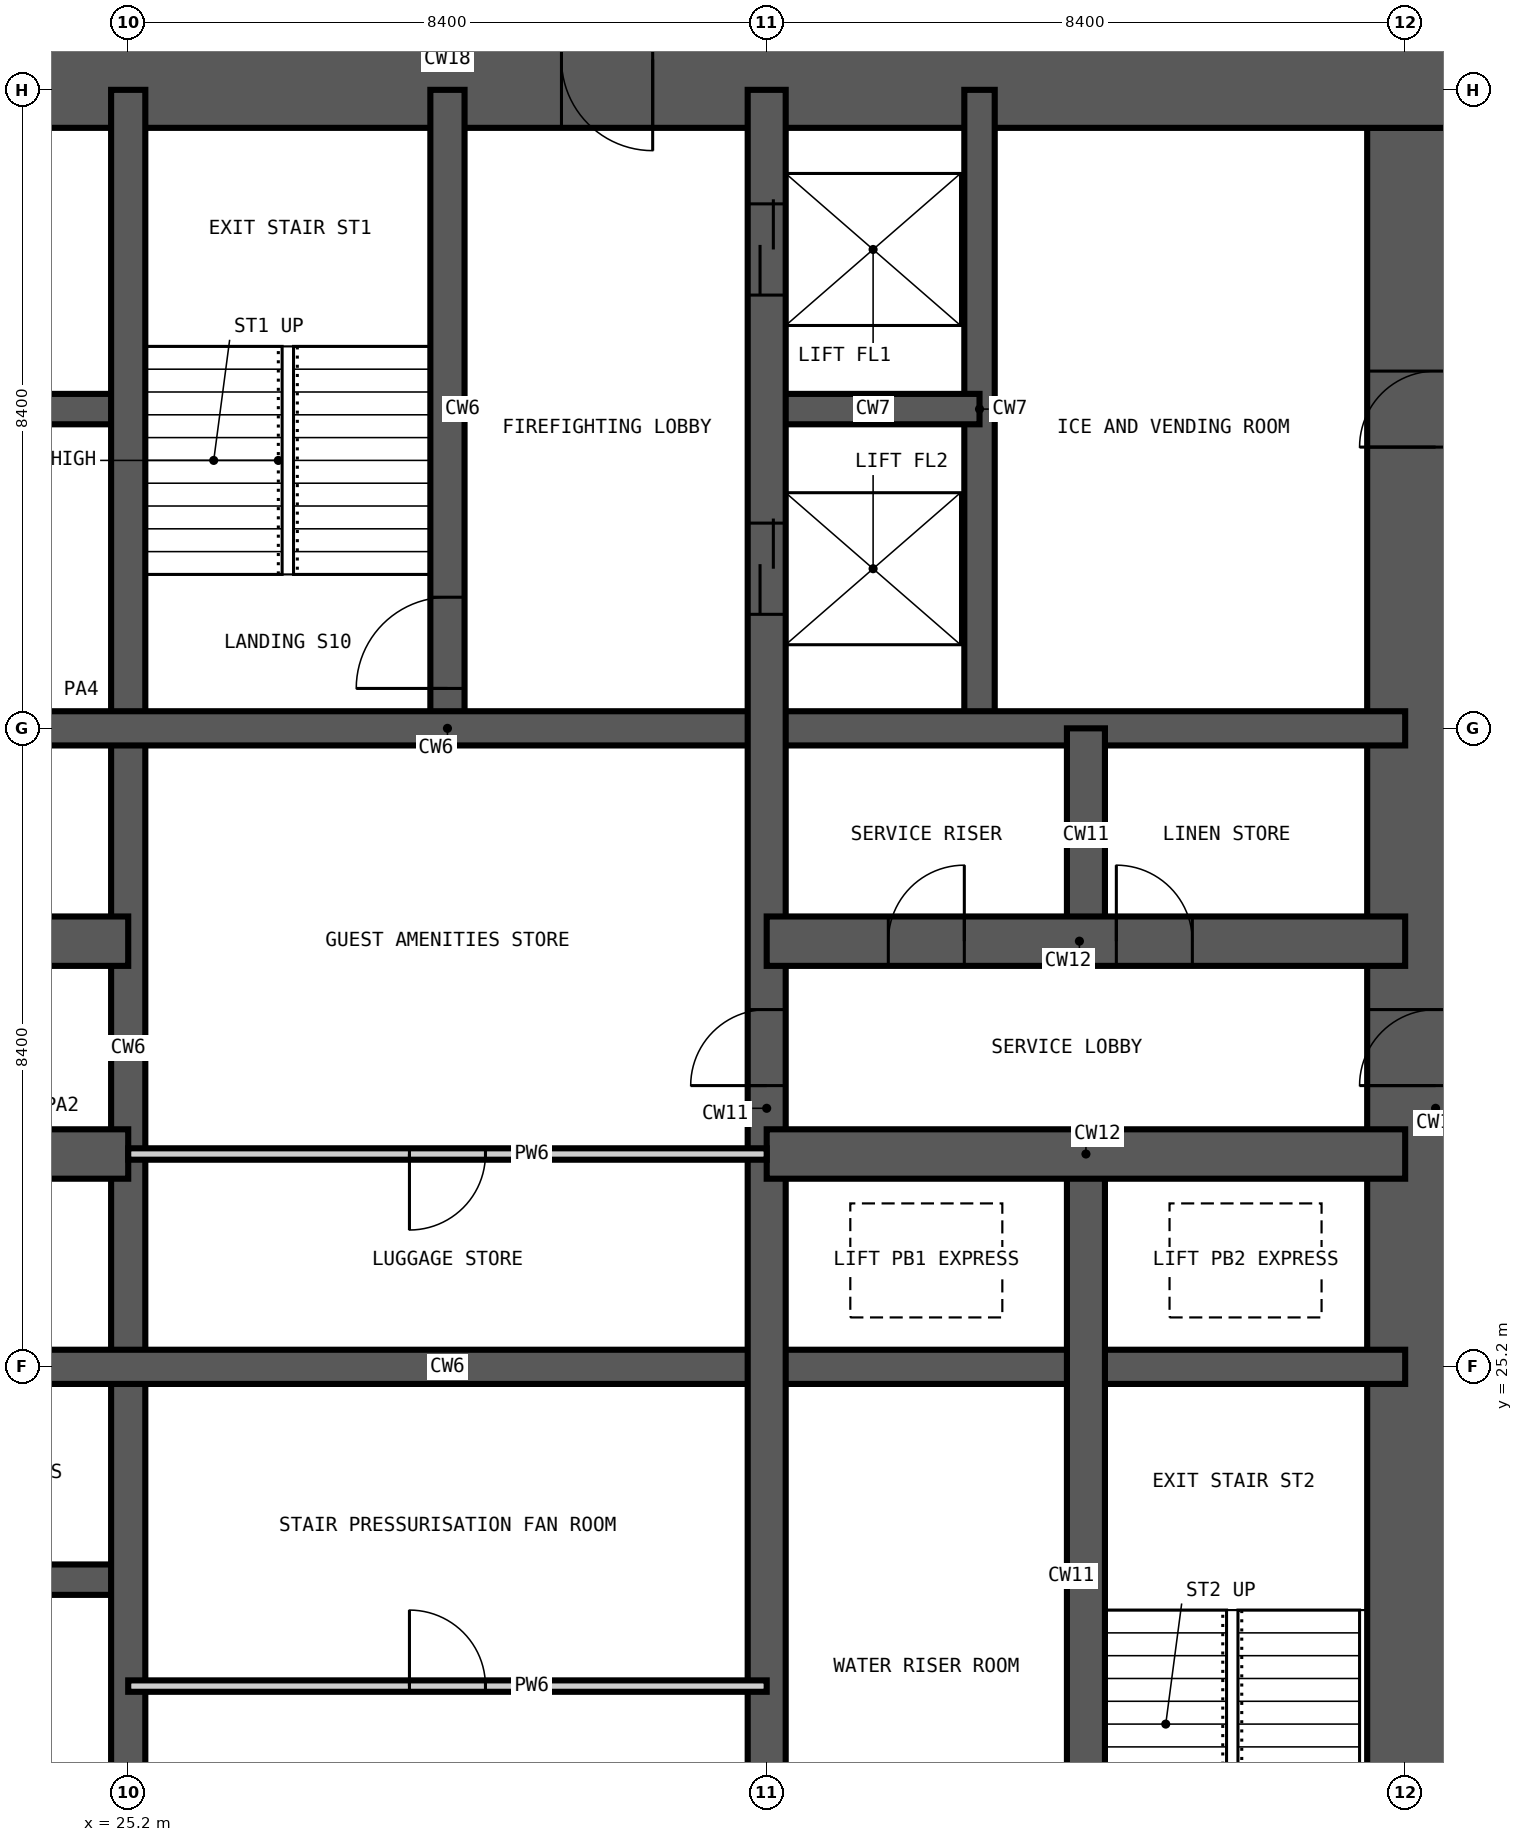
"""IFC4 building model, lengths in metres.
Left out: names, types, materials, properties, quantities, classifications, styles, units other than length and angle.
Written with IfcOpenShell. Run it as: python <this file> out.ifc"""

import sys

from ifc_helpers import new_model, si_unit, direction, frame, frame_2d, origin, place, context, subcontext, project, spatial, rectangle, extrude, element, fill, save


model = new_model("IFC4")
c1 = context("Model", 3, precision=1e-05, world=origin(), true_north=direction((0.0, 1.0)))
c2 = subcontext(c1, "Body", "Model", "MODEL_VIEW")
j1 = project(units=[si_unit("LENGTHUNIT", "METRE"), si_unit("PLANEANGLEUNIT", "RADIAN")], contexts=[c1])
p1 = place(None, origin())
s1 = spatial("IfcSite", under=j1, at=p1, CompositionType="ELEMENT")
p2 = place(p1, origin())
s2 = spatial("IfcBuilding", under=s1, at=p2, CompositionType="ELEMENT")
p3 = place(p2, frame((0.0, 0.0, 30.6)))
s3 = spatial("IfcBuildingStorey", under=s2, at=p3, CompositionType="ELEMENT", Elevation=30.6)
p4 = place(p3, frame((42.4, 17.3, -0.35), z_axis=(0.0, 0.0, 1.0), x_axis=(0.0, 1.0, 0.0)))
e1 = element("IfcWall", 1, at=p4, inside=s3, PredefinedType="SHEAR", context=c2, shape_type="SweptSolid", body=[
    extrude(rectangle(XDim=24.2, YDim=1.8, at=frame_2d((12.1, 0.0))), origin(), (0.0, 0.0, 1.0), 3.6),
])
p5 = place(p4, frame((0.3, 0.0, 0.35)))
e2 = element("IfcOpeningElement", 2, at=p5, cuts=e1, PredefinedType="OPENING", context=c2, shape_type="SweptSolid", body=[
    extrude(rectangle(XDim=1.2, YDim=2.2, at=frame_2d((0.6, 1.1))), frame((0.0, 0.91, 0.0), z_axis=(0.0, -1.0, 0.0), x_axis=(1.0, 0.0, 0.0)), (0.0, 0.0, 1.0), 1.82),
])
p6 = place(p4, frame((11.6, 0.0, 0.35)))
e3 = element("IfcOpeningElement", 3, at=p6, cuts=e1, PredefinedType="OPENING", context=c2, shape_type="SweptSolid", body=[
    extrude(rectangle(XDim=1.0, YDim=2.1, at=frame_2d((0.5, 1.05))), frame((0.0, 0.91, 0.0), z_axis=(0.0, -1.0, 0.0), x_axis=(1.0, 0.0, 0.0)), (0.0, 0.0, 1.0), 1.82),
])
p7 = place(p4, frame((20.0, 0.0, 0.35)))
e4 = element("IfcOpeningElement", 4, at=p7, cuts=e1, PredefinedType="OPENING", context=c2, shape_type="SweptSolid", body=[
    extrude(rectangle(XDim=1.0, YDim=2.1, at=frame_2d((0.5, 1.05))), frame((0.0, 0.91, 0.0), z_axis=(0.0, -1.0, 0.0), x_axis=(1.0, 0.0, 0.0)), (0.0, 0.0, 1.0), 1.82),
])
p8 = place(p3, frame((43.3, 42.4, -0.35), z_axis=(0.0, 0.0, 1.0), x_axis=(-1.0, 0.0, 0.0)))
e5 = element("IfcWall", 5, at=p8, inside=s3, PredefinedType="SHEAR", context=c2, shape_type="SweptSolid", body=[
    extrude(rectangle(XDim=27.8, YDim=1.8, at=frame_2d((13.9, 0.0))), origin(), (0.0, 0.0, 1.0), 3.6),
])
p9 = place(p8, frame((21.8, 0.0, 0.35)))
e6 = element("IfcOpeningElement", 6, at=p9, cuts=e5, PredefinedType="OPENING", context=c2, shape_type="SweptSolid", body=[
    extrude(rectangle(XDim=1.0, YDim=2.1, at=frame_2d((0.5, 1.05))), frame((0.0, 0.91, 0.0), z_axis=(0.0, -1.0, 0.0), x_axis=(1.0, 0.0, 0.0)), (0.0, 0.0, 1.0), 1.82),
])
p10 = place(p8, frame((11.2, 0.0, 0.35)))
e7 = element("IfcOpeningElement", 7, at=p10, cuts=e5, PredefinedType="OPENING", context=c2, shape_type="SweptSolid", body=[
    extrude(rectangle(XDim=1.2, YDim=2.2, at=frame_2d((0.6, 1.1))), frame((0.0, 0.91, 0.0), z_axis=(0.0, -1.0, 0.0), x_axis=(1.0, 0.0, 0.0)), (0.0, 0.0, 1.0), 1.82),
])
for number, where, z_axis, x_axis in (
    (8, (36.4, 33.6, -0.35), (0.0, 0.0, 1.0), (0.0, 1.0, 0.0)),
    (9, (16.8, 22.4, -0.35), (0.0, 0.0, 1.0), (1.0, 0.0, 0.0)),
    (10, (16.8, 37.8, -0.35), (0.0, 0.0, 1.0), (1.0, 0.0, 0.0)),
):
    element("IfcWall", number, at=place(p3, frame(where, z_axis=z_axis, x_axis=x_axis)), inside=s3, PredefinedType="SHEAR", context=c2, shape_type="SweptSolid", body=[
        extrude(rectangle(XDim=8.4, YDim=0.4, at=frame_2d((4.2, 0.0))), origin(), (0.0, 0.0, 1.0), 3.6),
    ])
p11 = place(p3, frame((33.6, 37.8, -0.35), z_axis=(0.0, 0.0, 1.0), x_axis=(1.0, 0.0, 0.0)))
e11 = element("IfcWall", 11, at=p11, inside=s3, PredefinedType="SHEAR", context=c2, shape_type="SweptSolid", body=[
    extrude(rectangle(XDim=2.8, YDim=0.4, at=frame_2d((1.4, 0.0))), origin(), (0.0, 0.0, 1.0), 3.6),
])
p12 = place(p3, frame((25.2, 16.8, -0.35), z_axis=(0.0, 0.0, 1.0), x_axis=(0.0, 1.0, 0.0)))
e12 = element("IfcWall", 12, at=p12, inside=s3, PredefinedType="SHEAR", context=c2, shape_type="SweptSolid", body=[
    extrude(rectangle(XDim=25.2, YDim=0.45, at=frame_2d((12.6, 0.0))), origin(), (0.0, 0.0, 1.0), 3.6),
])
p13 = place(p3, frame((29.4, 33.6, -0.35), z_axis=(0.0, 0.0, 1.0), x_axis=(0.0, 1.0, 0.0)))
e13 = element("IfcWall", 13, at=p13, inside=s3, PredefinedType="SHEAR", context=c2, shape_type="SweptSolid", body=[
    extrude(rectangle(XDim=8.4, YDim=0.45, at=frame_2d((4.2, 0.0))), origin(), (0.0, 0.0, 1.0), 3.6),
])
p14 = place(p13, frame((0.525, 0.0, 0.35)))
e14 = element("IfcOpeningElement", 14, at=p14, cuts=e13, PredefinedType="OPENING", context=c2, shape_type="SweptSolid", body=[
    extrude(rectangle(XDim=1.2, YDim=2.2, at=frame_2d((0.6, 1.1))), frame((0.0, 0.235, 0.0), z_axis=(0.0, -1.0, 0.0), x_axis=(1.0, 0.0, 0.0)), (0.0, 0.0, 1.0), 0.47),
])
for number, where, z_axis, x_axis in (
    (15, (16.8, 25.2, -0.35), (0.0, 0.0, 1.0), (1.0, 0.0, 0.0)),
    (16, (16.8, 33.6, -0.35), (0.0, 0.0, 1.0), (1.0, 0.0, 0.0)),
):
    element("IfcWall", number, at=place(p3, frame(where, z_axis=z_axis, x_axis=x_axis)), inside=s3, PredefinedType="SHEAR", context=c2, shape_type="SweptSolid", body=[
        extrude(rectangle(XDim=25.2, YDim=0.45, at=frame_2d((12.6, 0.0))), origin(), (0.0, 0.0, 1.0), 3.6),
    ])
p15 = place(p3, frame((33.6, 16.8, -0.35), z_axis=(0.0, 0.0, 1.0), x_axis=(0.0, 1.0, 0.0)))
e17 = element("IfcWall", 17, at=p15, inside=s3, PredefinedType="SHEAR", context=c2, shape_type="SweptSolid", body=[
    extrude(rectangle(XDim=25.2, YDim=0.5, at=frame_2d((12.6, 0.0))), origin(), (0.0, 0.0, 1.0), 3.6),
])
p16 = place(p15, frame((22.5, 0.0, 0.35)))
e18 = element("IfcOpeningElement", 18, at=p16, cuts=e17, PredefinedType="OPENING", context=c2, shape_type="SweptSolid", body=[
    extrude(rectangle(XDim=1.2, YDim=2.2, at=frame_2d((0.6, 1.1))), frame((0.0, 0.26, 0.0), z_axis=(0.0, -1.0, 0.0), x_axis=(1.0, 0.0, 0.0)), (0.0, 0.0, 1.0), 0.52),
])
p17 = place(p15, frame((18.3, 0.0, 0.35)))
e19 = element("IfcOpeningElement", 19, at=p17, cuts=e17, PredefinedType="OPENING", context=c2, shape_type="SweptSolid", body=[
    extrude(rectangle(XDim=1.2, YDim=2.2, at=frame_2d((0.6, 1.1))), frame((0.0, 0.26, 0.0), z_axis=(0.0, -1.0, 0.0), x_axis=(1.0, 0.0, 0.0)), (0.0, 0.0, 1.0), 0.52),
])
p18 = place(p15, frame((12.1, 0.0, 0.35)))
e20 = element("IfcOpeningElement", 20, at=p18, cuts=e17, PredefinedType="OPENING", context=c2, shape_type="SweptSolid", body=[
    extrude(rectangle(XDim=1.0, YDim=2.1, at=frame_2d((0.5, 1.05))), frame((0.0, 0.26, 0.0), z_axis=(0.0, -1.0, 0.0), x_axis=(1.0, 0.0, 0.0)), (0.0, 0.0, 1.0), 0.52),
])
p19 = place(p3, frame((37.8, 16.8, -0.35), z_axis=(0.0, 0.0, 1.0), x_axis=(0.0, 1.0, 0.0)))
e21 = element("IfcWall", 21, at=p19, inside=s3, PredefinedType="SHEAR", context=c2, shape_type="SweptSolid", body=[
    extrude(rectangle(XDim=11.2, YDim=0.5, at=frame_2d((5.6, 0.0))), origin(), (0.0, 0.0, 1.0), 3.6),
])
p20 = place(p3, frame((37.8, 30.8, -0.35), z_axis=(0.0, 0.0, 1.0), x_axis=(0.0, 1.0, 0.0)))
e22 = element("IfcWall", 22, at=p20, inside=s3, PredefinedType="SHEAR", context=c2, shape_type="SweptSolid", body=[
    extrude(rectangle(XDim=2.8, YDim=0.5, at=frame_2d((1.4, 0.0))), origin(), (0.0, 0.0, 1.0), 3.6),
])
p21 = place(p3, frame((16.8, 28.0, -0.35), z_axis=(0.0, 0.0, 1.0), x_axis=(1.0, 0.0, 0.0)))
e23 = element("IfcWall", 23, at=p21, inside=s3, PredefinedType="SHEAR", context=c2, shape_type="SweptSolid", body=[
    extrude(rectangle(XDim=8.4, YDim=0.65, at=frame_2d((4.2, 0.0))), origin(), (0.0, 0.0, 1.0), 3.6),
])
p22 = place(p21, frame((1.55, 0.0, 0.35)))
e24 = element("IfcOpeningElement", 24, at=p22, cuts=e23, PredefinedType="OPENING", context=c2, shape_type="SweptSolid", body=[
    extrude(rectangle(XDim=1.1, YDim=2.2, at=frame_2d((0.55, 1.1))), frame((0.0, 0.335, 0.0), z_axis=(0.0, -1.0, 0.0), x_axis=(1.0, 0.0, 0.0)), (0.0, 0.0, 1.0), 0.67),
])
p23 = place(p21, frame((5.75, 0.0, 0.35)))
e25 = element("IfcOpeningElement", 25, at=p23, cuts=e23, PredefinedType="OPENING", context=c2, shape_type="SweptSolid", body=[
    extrude(rectangle(XDim=1.1, YDim=2.2, at=frame_2d((0.55, 1.1))), frame((0.0, 0.335, 0.0), z_axis=(0.0, -1.0, 0.0), x_axis=(1.0, 0.0, 0.0)), (0.0, 0.0, 1.0), 0.67),
])
p24 = place(p3, frame((33.6, 28.0, -0.35), z_axis=(0.0, 0.0, 1.0), x_axis=(1.0, 0.0, 0.0)))
e26 = element("IfcWall", 26, at=p24, inside=s3, PredefinedType="SHEAR", context=c2, shape_type="SweptSolid", body=[
    extrude(rectangle(XDim=8.4, YDim=0.65, at=frame_2d((4.2, 0.0))), origin(), (0.0, 0.0, 1.0), 3.6),
])
p25 = place(p3, frame((16.8, 30.8, -0.35), z_axis=(0.0, 0.0, 1.0), x_axis=(1.0, 0.0, 0.0)))
e27 = element("IfcWall", 27, at=p25, inside=s3, PredefinedType="SHEAR", context=c2, shape_type="SweptSolid", body=[
    extrude(rectangle(XDim=8.4, YDim=0.65, at=frame_2d((4.2, 0.0))), origin(), (0.0, 0.0, 1.0), 3.6),
])
p26 = place(p25, frame((1.55, 0.0, 0.35)))
e28 = element("IfcOpeningElement", 28, at=p26, cuts=e27, PredefinedType="OPENING", context=c2, shape_type="SweptSolid", body=[
    extrude(rectangle(XDim=1.1, YDim=2.2, at=frame_2d((0.55, 1.1))), frame((0.0, 0.335, 0.0), z_axis=(0.0, -1.0, 0.0), x_axis=(1.0, 0.0, 0.0)), (0.0, 0.0, 1.0), 0.67),
])
p27 = place(p25, frame((5.75, 0.0, 0.35)))
e29 = element("IfcOpeningElement", 29, at=p27, cuts=e27, PredefinedType="OPENING", context=c2, shape_type="SweptSolid", body=[
    extrude(rectangle(XDim=1.1, YDim=2.2, at=frame_2d((0.55, 1.1))), frame((0.0, 0.335, 0.0), z_axis=(0.0, -1.0, 0.0), x_axis=(1.0, 0.0, 0.0)), (0.0, 0.0, 1.0), 0.67),
])
p28 = place(p3, frame((33.6, 30.8, -0.35), z_axis=(0.0, 0.0, 1.0), x_axis=(1.0, 0.0, 0.0)))
e30 = element("IfcWall", 30, at=p28, inside=s3, PredefinedType="SHEAR", context=c2, shape_type="SweptSolid", body=[
    extrude(rectangle(XDim=8.4, YDim=0.65, at=frame_2d((4.2, 0.0))), origin(), (0.0, 0.0, 1.0), 3.6),
])
p29 = place(p28, frame((1.6, 0.0, 0.35)))
e31 = element("IfcOpeningElement", 31, at=p29, cuts=e30, PredefinedType="OPENING", context=c2, shape_type="SweptSolid", body=[
    extrude(rectangle(XDim=1.0, YDim=2.1, at=frame_2d((0.5, 1.05))), frame((0.0, 0.335, 0.0), z_axis=(0.0, -1.0, 0.0), x_axis=(1.0, 0.0, 0.0)), (0.0, 0.0, 1.0), 0.67),
])
p30 = place(p28, frame((4.6, 0.0, 0.35)))
e32 = element("IfcOpeningElement", 32, at=p30, cuts=e30, PredefinedType="OPENING", context=c2, shape_type="SweptSolid", body=[
    extrude(rectangle(XDim=1.0, YDim=2.1, at=frame_2d((0.5, 1.05))), frame((0.0, 0.335, 0.0), z_axis=(0.0, -1.0, 0.0), x_axis=(1.0, 0.0, 0.0)), (0.0, 0.0, 1.0), 0.67),
])
p31 = place(p3, frame((25.2, 21.0, 0.0), z_axis=(0.0, 0.0, 1.0), x_axis=(1.0, 0.0, 0.0)))
e33 = element("IfcWall", 33, at=p31, inside=s3, PredefinedType="PARTITIONING", context=c2, shape_type="SweptSolid", body=[
    extrude(rectangle(XDim=8.4, YDim=0.15, at=frame_2d((4.2, 0.0))), origin(), (0.0, 0.0, 1.0), 3.25),
])
p32 = place(p31, frame((3.7, 0.0, 0.0)))
e34 = element("IfcOpeningElement", 34, at=p32, cuts=e33, PredefinedType="OPENING", context=c2, shape_type="SweptSolid", body=[
    extrude(rectangle(XDim=1.0, YDim=2.1, at=frame_2d((0.5, 1.05))), frame((0.0, 0.085, 0.0), z_axis=(0.0, -1.0, 0.0), x_axis=(1.0, 0.0, 0.0)), (0.0, 0.0, 1.0), 0.17),
])
p33 = place(p3, frame((25.2, 28.0, 0.0), z_axis=(0.0, 0.0, 1.0), x_axis=(1.0, 0.0, 0.0)))
e35 = element("IfcWall", 35, at=p33, inside=s3, PredefinedType="PARTITIONING", context=c2, shape_type="SweptSolid", body=[
    extrude(rectangle(XDim=8.4, YDim=0.15, at=frame_2d((4.2, 0.0))), origin(), (0.0, 0.0, 1.0), 3.25),
])
p34 = place(p33, frame((3.7, 0.0, 0.0)))
e36 = element("IfcOpeningElement", 36, at=p34, cuts=e35, PredefinedType="OPENING", context=c2, shape_type="SweptSolid", body=[
    extrude(rectangle(XDim=1.0, YDim=2.1, at=frame_2d((0.5, 1.05))), frame((0.0, 0.085, 0.0), z_axis=(0.0, -1.0, 0.0), x_axis=(1.0, 0.0, 0.0)), (0.0, 0.0, 1.0), 0.17),
])
p35 = place(p14, origin())
e37 = element("IfcDoor", 37, at=p35, inside=s3, OperationType="SINGLE_SWING_LEFT", PredefinedType="DOOR", context=c2, shape_type="SweptSolid", body=[
    extrude(rectangle(XDim=1.2, YDim=2.2, at=frame_2d((0.6, 1.1))), frame((0.0, 0.025, 0.0), z_axis=(0.0, -1.0, 0.0), x_axis=(1.0, 0.0, 0.0)), (0.0, 0.0, 1.0), 0.05),
])
fill(e14, e37)
p36 = place(p16, origin())
e38 = element("IfcDoor", 38, at=p36, inside=s3, OperationType="DOUBLE_DOOR_SLIDING", PredefinedType="DOOR", context=c2, shape_type="SweptSolid", body=[
    extrude(rectangle(XDim=1.2, YDim=2.2, at=frame_2d((0.6, 1.1))), frame((0.0, 0.025, 0.0), z_axis=(0.0, -1.0, 0.0), x_axis=(1.0, 0.0, 0.0)), (0.0, 0.0, 1.0), 0.05),
])
fill(e18, e38)
p37 = place(p17, origin())
e39 = element("IfcDoor", 39, at=p37, inside=s3, OperationType="DOUBLE_DOOR_SLIDING", PredefinedType="DOOR", context=c2, shape_type="SweptSolid", body=[
    extrude(rectangle(XDim=1.2, YDim=2.2, at=frame_2d((0.6, 1.1))), frame((0.0, 0.025, 0.0), z_axis=(0.0, -1.0, 0.0), x_axis=(1.0, 0.0, 0.0)), (0.0, 0.0, 1.0), 0.05),
])
fill(e19, e39)
p38 = place(p18, origin())
e40 = element("IfcDoor", 40, at=p38, inside=s3, OperationType="SINGLE_SWING_LEFT", PredefinedType="DOOR", context=c2, shape_type="SweptSolid", body=[
    extrude(rectangle(XDim=1.0, YDim=2.1, at=frame_2d((0.5, 1.05))), frame((0.0, 0.025, 0.0), z_axis=(0.0, -1.0, 0.0), x_axis=(1.0, 0.0, 0.0)), (0.0, 0.0, 1.0), 0.05),
])
fill(e20, e40)
p39 = place(p34, frame((1.0, 0.0, 0.0), z_axis=(0.0, 0.0, 1.0), x_axis=(-1.0, 0.0, 0.0)))
e41 = element("IfcDoor", 41, at=p39, inside=s3, OperationType="SINGLE_SWING_RIGHT", PredefinedType="DOOR", context=c2, shape_type="SweptSolid", body=[
    extrude(rectangle(XDim=1.0, YDim=2.1, at=frame_2d((0.5, 1.05))), frame((0.0, 0.025, 0.0), z_axis=(0.0, -1.0, 0.0), x_axis=(1.0, 0.0, 0.0)), (0.0, 0.0, 1.0), 0.05),
])
fill(e36, e41)
p40 = place(p29, origin())
e42 = element("IfcDoor", 42, at=p40, inside=s3, OperationType="SINGLE_SWING_RIGHT", PredefinedType="DOOR", context=c2, shape_type="SweptSolid", body=[
    extrude(rectangle(XDim=1.0, YDim=2.1, at=frame_2d((0.5, 1.05))), frame((0.0, 0.025, 0.0), z_axis=(0.0, -1.0, 0.0), x_axis=(1.0, 0.0, 0.0)), (0.0, 0.0, 1.0), 0.05),
])
fill(e31, e42)
p41 = place(p30, origin())
e43 = element("IfcDoor", 43, at=p41, inside=s3, OperationType="SINGLE_SWING_LEFT", PredefinedType="DOOR", context=c2, shape_type="SweptSolid", body=[
    extrude(rectangle(XDim=1.0, YDim=2.1, at=frame_2d((0.5, 1.05))), frame((0.0, 0.025, 0.0), z_axis=(0.0, -1.0, 0.0), x_axis=(1.0, 0.0, 0.0)), (0.0, 0.0, 1.0), 0.05),
])
fill(e32, e43)
p42 = place(p6, origin())
e44 = element("IfcDoor", 44, at=p42, inside=s3, OperationType="SINGLE_SWING_LEFT", PredefinedType="DOOR", context=c2, shape_type="SweptSolid", body=[
    extrude(rectangle(XDim=1.0, YDim=2.1, at=frame_2d((0.5, 1.05))), frame((0.0, 0.025, 0.0), z_axis=(0.0, -1.0, 0.0), x_axis=(1.0, 0.0, 0.0)), (0.0, 0.0, 1.0), 0.05),
])
fill(e3, e44)
p43 = place(p10, origin())
e45 = element("IfcDoor", 45, at=p43, inside=s3, OperationType="SINGLE_SWING_LEFT", PredefinedType="DOOR", context=c2, shape_type="SweptSolid", body=[
    extrude(rectangle(XDim=1.2, YDim=2.2, at=frame_2d((0.6, 1.1))), frame((0.0, 0.025, 0.0), z_axis=(0.0, -1.0, 0.0), x_axis=(1.0, 0.0, 0.0)), (0.0, 0.0, 1.0), 0.05),
])
fill(e7, e45)
p44 = place(p7, origin())
e46 = element("IfcDoor", 46, at=p44, inside=s3, OperationType="SINGLE_SWING_LEFT", PredefinedType="DOOR", context=c2, shape_type="SweptSolid", body=[
    extrude(rectangle(XDim=1.0, YDim=2.1, at=frame_2d((0.5, 1.05))), frame((0.0, 0.025, 0.0), z_axis=(0.0, -1.0, 0.0), x_axis=(1.0, 0.0, 0.0)), (0.0, 0.0, 1.0), 0.05),
])
fill(e4, e46)
p45 = place(p32, origin())
e47 = element("IfcDoor", 47, at=p45, inside=s3, OperationType="SINGLE_SWING_LEFT", PredefinedType="DOOR", context=c2, shape_type="SweptSolid", body=[
    extrude(rectangle(XDim=1.0, YDim=2.1, at=frame_2d((0.5, 1.05))), frame((0.0, 0.025, 0.0), z_axis=(0.0, -1.0, 0.0), x_axis=(1.0, 0.0, 0.0)), (0.0, 0.0, 1.0), 0.05),
])
fill(e34, e47)
save(model, sys.argv[1])
